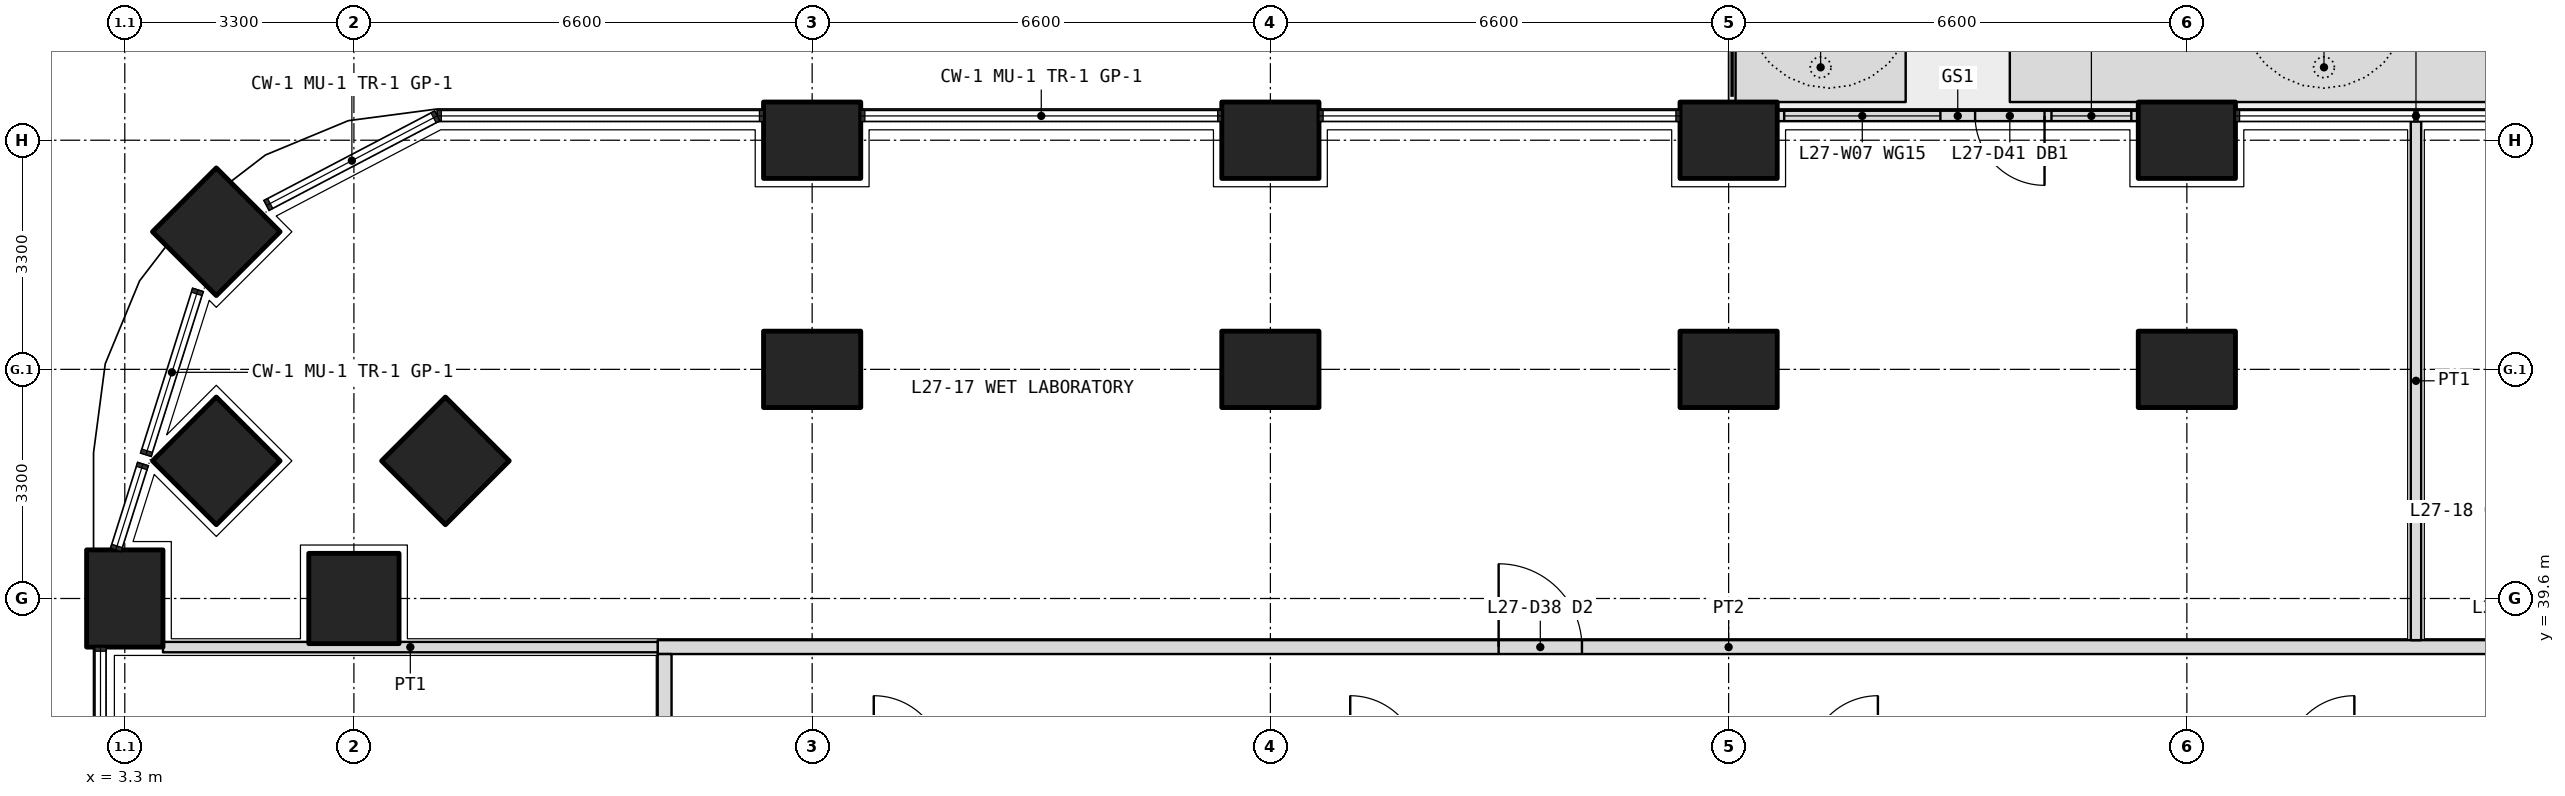
"""IFC4 building model, lengths in metres.
Left out: names, types, materials, properties, quantities, classifications, styles, units other than length and angle.
Written with IfcOpenShell. Run it as: python <this file> out.ifc"""

import sys

from ifc_helpers import new_model, si_unit, direction, frame, frame_2d, origin, origin_2d, place, context, subcontext, project, spatial, polyline, rectangle, outline, extrude, element, fill, save


model = new_model("IFC4")
c1 = context("Model", 3, precision=1e-05, world=origin(), true_north=direction((0.0, 1.0)))
c2 = subcontext(c1, "Body", "Model", "MODEL_VIEW")
j1 = project(units=[si_unit("LENGTHUNIT", "METRE"), si_unit("PLANEANGLEUNIT", "RADIAN")], contexts=[c1])
p1 = place(None, origin())
s1 = spatial("IfcSite", under=j1, at=p1, CompositionType="ELEMENT")
p2 = place(p1, origin())
s2 = spatial("IfcBuilding", under=s1, at=p2, CompositionType="ELEMENT")
p3 = place(p2, frame((0.0, 0.0, 120.0)))
s3 = spatial("IfcBuildingStorey", under=s2, at=p3, CompositionType="ELEMENT", Elevation=120.0)
p4 = place(p3, frame((4.618, 44.882, 0.0), z_axis=(0.0, 0.0, 1.0), x_axis=(0.707106781187, 0.707106781187, 0.0)))
e1 = element("IfcColumn", 1, at=p4, inside=s3, PredefinedType="COLUMN", context=c2, shape_type="SweptSolid", body=[
    extrude(rectangle(XDim=1.3, YDim=1.3, at=origin_2d()), origin(), (0.0, 0.0, 1.0), 4.2),
])
for number, where, z_axis, x_axis in (
    (2, (3.3, 39.6, 0.0), (0.0, 0.0, 1.0), (0.0, 1.0, 0.0)),
    (3, (13.2, 46.2, 0.0), (0.0, 0.0, 1.0), (1.0, 0.0, 0.0)),
    (4, (19.8, 46.2, 0.0), (0.0, 0.0, 1.0), (1.0, 0.0, 0.0)),
    (5, (26.4, 46.2, 0.0), (0.0, 0.0, 1.0), (1.0, 0.0, 0.0)),
    (6, (33.0, 46.2, 0.0), (0.0, 0.0, 1.0), (1.0, 0.0, 0.0)),
):
    element("IfcColumn", number, at=place(p3, frame(where, z_axis=z_axis, x_axis=x_axis)), inside=s3, PredefinedType="COLUMN", context=c2, shape_type="SweptSolid", body=[
        extrude(rectangle(XDim=1.4, YDim=1.1, at=origin_2d()), origin(), (0.0, 0.0, 1.0), 4.2),
    ])
for number, where, z_axis, x_axis in (
    (7, (6.6, 39.6, 0.0), (0.0, 0.0, 1.0), (1.0, 0.0, 0.0)),
    (8, (4.618, 41.582, 0.0), (0.0, 0.0, 1.0), (0.707, 0.707, 0.0)),
):
    element("IfcColumn", number, at=place(p3, frame(where, z_axis=z_axis, x_axis=x_axis)), inside=s3, PredefinedType="COLUMN", context=c2, shape_type="SweptSolid", body=[
        extrude(rectangle(XDim=1.3, YDim=1.3, at=origin_2d()), origin(), (0.0, 0.0, 1.0), 4.2),
    ])
for number, where, z_axis, x_axis in (
    (9, (13.2, 42.9, 0.0), (0.0, 0.0, 1.0), (1.0, 0.0, 0.0)),
    (10, (19.8, 42.9, 0.0), (0.0, 0.0, 1.0), (1.0, 0.0, 0.0)),
    (11, (26.4, 42.9, 0.0), (0.0, 0.0, 1.0), (1.0, 0.0, 0.0)),
    (12, (33.0, 42.9, 0.0), (0.0, 0.0, 1.0), (1.0, 0.0, 0.0)),
):
    element("IfcColumn", number, at=place(p3, frame(where, z_axis=z_axis, x_axis=x_axis)), inside=s3, PredefinedType="COLUMN", context=c2, shape_type="SweptSolid", body=[
        extrude(rectangle(XDim=1.4, YDim=1.1, at=origin_2d()), origin(), (0.0, 0.0, 1.0), 4.2),
    ])
p5 = place(p3, frame((7.918, 41.582, 0.0), z_axis=(0.0, 0.0, 1.0), x_axis=(0.707106781187, 0.707106781187, 0.0)))
e13 = element("IfcColumn", 13, at=p5, inside=s3, PredefinedType="COLUMN", context=c2, shape_type="SweptSolid", body=[
    extrude(rectangle(XDim=1.3, YDim=1.3, at=origin_2d()), origin(), (0.0, 0.0, 1.0), 4.2),
])
p6 = place(p3, origin())
e14 = element("IfcWall", 14, at=p6, inside=s3, PredefinedType="USERDEFINED", context=c2, shape_type="SweptSolid", body=[
    extrude(outline(polyline([(26.5, 46.75), (28.95, 46.75), (28.95, 47.75), (26.5, 47.75), (26.5, 46.75)]), holes=[polyline([(26.65, 46.9), (28.8, 46.9), (28.8, 47.6), (26.65, 47.6), (26.65, 46.9)])]), origin(), (0.0, 0.0, 1.0), 1.05),
])
p7 = place(p3, origin())
e15 = element("IfcWall", 15, at=p7, inside=s3, PredefinedType="USERDEFINED", context=c2, shape_type="SweptSolid", body=[
    extrude(outline(polyline([(30.45, 46.75), (39.5, 46.75), (39.5, 47.75), (30.45, 47.75), (30.45, 46.75)]), holes=[polyline([(30.6, 46.9), (39.35, 46.9), (39.35, 47.6), (30.6, 47.6), (30.6, 46.9)])]), origin(), (0.0, 0.0, 1.0), 1.05),
])
p8 = place(p3, frame((32.3, 46.55, 0.0), z_axis=(0.0, 0.0, 1.0), x_axis=(-1.0, 0.0, 0.0)))
e16 = element("IfcWall", 16, at=p8, inside=s3, PredefinedType="SOLIDWALL", context=c2, shape_type="SweptSolid", body=[
    extrude(rectangle(XDim=5.2, YDim=0.15, at=frame_2d((2.6, 0.0))), origin(), (0.0, 0.0, 1.0), 2.7),
])
p9 = place(p8, frame((1.35, 0.0, 0.0)))
e17 = element("IfcOpeningElement", 17, at=p9, cuts=e16, PredefinedType="OPENING", context=c2, shape_type="SweptSolid", body=[
    extrude(rectangle(XDim=1.0, YDim=2.4, at=frame_2d((0.5, 1.2))), frame((0.0, 0.085, 0.0), z_axis=(0.0, -1.0, 0.0), x_axis=(1.0, 0.0, 0.0)), (0.0, 0.0, 1.0), 0.17),
])
p10 = place(p8, frame((0.1, 0.0, 0.1)))
e18 = element("IfcOpeningElement", 18, at=p10, cuts=e16, PredefinedType="OPENING", context=c2, shape_type="SweptSolid", body=[
    extrude(rectangle(XDim=1.15, YDim=2.3, at=frame_2d((0.575, 1.15))), frame((0.0, 0.085, 0.0), z_axis=(0.0, -1.0, 0.0), x_axis=(1.0, 0.0, 0.0)), (0.0, 0.0, 1.0), 0.17),
])
p11 = place(p8, frame((2.85, 0.0, 0.1)))
e19 = element("IfcOpeningElement", 19, at=p11, cuts=e16, PredefinedType="OPENING", context=c2, shape_type="SweptSolid", body=[
    extrude(rectangle(XDim=2.25, YDim=2.3, at=frame_2d((1.125, 1.15))), frame((0.0, 0.085, 0.0), z_axis=(0.0, -1.0, 0.0), x_axis=(1.0, 0.0, 0.0)), (0.0, 0.0, 1.0), 0.17),
])
p12 = place(p3, frame((10.975, 38.9, 0.0), z_axis=(0.0, 0.0, 1.0), x_axis=(1.0, 0.0, 0.0)))
e20 = element("IfcWall", 20, at=p12, inside=s3, PredefinedType="PARTITIONING", context=c2, shape_type="SweptSolid", body=[
    extrude(rectangle(XDim=30.85, YDim=0.2, at=frame_2d((15.425, 0.0))), origin(), (0.0, 0.0, 1.0), 2.85),
])
p13 = place(p12, frame((12.113, 0.0, 0.0)))
e21 = element("IfcOpeningElement", 21, at=p13, cuts=e20, PredefinedType="OPENING", context=c2, shape_type="SweptSolid", body=[
    extrude(rectangle(XDim=1.2, YDim=2.1, at=frame_2d((0.6, 1.05))), frame((0.0, 0.11, 0.0), z_axis=(0.0, -1.0, 0.0), x_axis=(1.0, 0.0, 0.0)), (0.0, 0.0, 1.0), 0.22),
])
p14 = place(p12, frame((26.475, 0.0, 0.0)))
e22 = element("IfcOpeningElement", 22, at=p14, cuts=e20, PredefinedType="OPENING", context=c2, shape_type="SweptSolid", body=[
    extrude(rectangle(XDim=1.0, YDim=2.1, at=frame_2d((0.5, 1.05))), frame((0.0, 0.11, 0.0), z_axis=(0.0, -1.0, 0.0), x_axis=(1.0, 0.0, 0.0)), (0.0, 0.0, 1.0), 0.22),
])
p15 = place(p12, frame((29.188, 0.0, 0.0)))
e23 = element("IfcOpeningElement", 23, at=p15, cuts=e20, PredefinedType="OPENING", context=c2, shape_type="SweptSolid", body=[
    extrude(rectangle(XDim=1.0, YDim=2.1, at=frame_2d((0.5, 1.05))), frame((0.0, 0.11, 0.0), z_axis=(0.0, -1.0, 0.0), x_axis=(1.0, 0.0, 0.0)), (0.0, 0.0, 1.0), 0.22),
])
p16 = place(p3, frame((11.075, 11.175, 0.0), z_axis=(0.0, 0.0, 1.0), x_axis=(0.0, 1.0, 0.0)))
e24 = element("IfcWall", 24, at=p16, inside=s3, PredefinedType="PARTITIONING", context=c2, shape_type="SweptSolid", body=[
    extrude(rectangle(XDim=27.625, YDim=0.2, at=frame_2d((13.812, 0.0))), origin(), (0.0, 0.0, 1.0), 2.85),
])
p17 = place(p16, frame((0.462, 0.0, 0.0)))
e25 = element("IfcOpeningElement", 25, at=p17, cuts=e24, PredefinedType="OPENING", context=c2, shape_type="SweptSolid", body=[
    extrude(rectangle(XDim=1.0, YDim=2.1, at=frame_2d((0.5, 1.05))), frame((0.0, 0.11, 0.0), z_axis=(0.0, -1.0, 0.0), x_axis=(1.0, 0.0, 0.0)), (0.0, 0.0, 1.0), 0.22),
])
p18 = place(p16, frame((2.575, 0.0, 0.0)))
e26 = element("IfcOpeningElement", 26, at=p18, cuts=e24, PredefinedType="OPENING", context=c2, shape_type="SweptSolid", body=[
    extrude(rectangle(XDim=1.0, YDim=2.1, at=frame_2d((0.5, 1.05))), frame((0.0, 0.11, 0.0), z_axis=(0.0, -1.0, 0.0), x_axis=(1.0, 0.0, 0.0)), (0.0, 0.0, 1.0), 0.22),
])
p19 = place(p16, frame((5.65, 0.0, 0.0)))
e27 = element("IfcOpeningElement", 27, at=p19, cuts=e24, PredefinedType="OPENING", context=c2, shape_type="SweptSolid", body=[
    extrude(rectangle(XDim=0.9, YDim=2.1, at=frame_2d((0.45, 1.05))), frame((0.0, 0.11, 0.0), z_axis=(0.0, -1.0, 0.0), x_axis=(1.0, 0.0, 0.0)), (0.0, 0.0, 1.0), 0.22),
])
p20 = place(p16, frame((9.5, 0.0, 0.0)))
e28 = element("IfcOpeningElement", 28, at=p20, cuts=e24, PredefinedType="OPENING", context=c2, shape_type="SweptSolid", body=[
    extrude(rectangle(XDim=0.9, YDim=2.1, at=frame_2d((0.45, 1.05))), frame((0.0, 0.11, 0.0), z_axis=(0.0, -1.0, 0.0), x_axis=(1.0, 0.0, 0.0)), (0.0, 0.0, 1.0), 0.22),
])
p21 = place(p16, frame((13.025, 0.0, 0.0)))
e29 = element("IfcOpeningElement", 29, at=p21, cuts=e24, PredefinedType="OPENING", context=c2, shape_type="SweptSolid", body=[
    extrude(rectangle(XDim=1.0, YDim=2.1, at=frame_2d((0.5, 1.05))), frame((0.0, 0.11, 0.0), z_axis=(0.0, -1.0, 0.0), x_axis=(1.0, 0.0, 0.0)), (0.0, 0.0, 1.0), 0.22),
])
p22 = place(p16, frame((20.975, 0.0, 0.0)))
e30 = element("IfcOpeningElement", 30, at=p22, cuts=e24, PredefinedType="OPENING", context=c2, shape_type="SweptSolid", body=[
    extrude(rectangle(XDim=1.0, YDim=2.1, at=frame_2d((0.5, 1.05))), frame((0.0, 0.11, 0.0), z_axis=(0.0, -1.0, 0.0), x_axis=(1.0, 0.0, 0.0)), (0.0, 0.0, 1.0), 0.22),
])
p23 = place(p3, frame((3.85, 38.9, 0.0), z_axis=(0.0, 0.0, 1.0), x_axis=(1.0, 0.0, 0.0)))
e31 = element("IfcWall", 31, at=p23, inside=s3, PredefinedType="PARTITIONING", context=c2, shape_type="SweptSolid", body=[
    extrude(rectangle(XDim=7.125, YDim=0.15, at=frame_2d((3.562, 0.0))), origin(), (0.0, 0.0, 1.0), 2.85),
])
p24 = place(p3, frame((36.3, 46.47, 0.0), z_axis=(0.0, 0.0, 1.0), x_axis=(0.0, -1.0, 0.0)))
e32 = element("IfcWall", 32, at=p24, inside=s3, PredefinedType="PARTITIONING", context=c2, shape_type="SweptSolid", body=[
    extrude(rectangle(XDim=7.47, YDim=0.15, at=frame_2d((3.735, 0.0))), origin(), (0.0, 0.0, 1.0), 2.7),
])
p25 = place(p9, origin())
e33 = element("IfcDoor", 33, at=p25, inside=s3, OperationType="SINGLE_SWING_LEFT", PredefinedType="DOOR", context=c2, shape_type="SweptSolid", body=[
    extrude(rectangle(XDim=1.0, YDim=2.4, at=frame_2d((0.5, 1.2))), frame((0.0, 0.025, 0.0), z_axis=(0.0, -1.0, 0.0), x_axis=(1.0, 0.0, 0.0)), (0.0, 0.0, 1.0), 0.05),
])
fill(e17, e33)
p26 = place(p10, origin())
e34 = element("IfcWindow", 34, at=p26, inside=s3, PartitioningType="SINGLE_PANEL", PredefinedType="WINDOW", context=c2, shape_type="SweptSolid", body=[
    extrude(rectangle(XDim=1.15, YDim=2.3, at=frame_2d((0.575, 1.15))), frame((0.0, 0.03, 0.0), z_axis=(0.0, -1.0, 0.0), x_axis=(1.0, 0.0, 0.0)), (0.0, 0.0, 1.0), 0.06),
])
fill(e18, e34)
p27 = place(p11, origin())
e35 = element("IfcWindow", 35, at=p27, inside=s3, PartitioningType="SINGLE_PANEL", PredefinedType="WINDOW", context=c2, shape_type="SweptSolid", body=[
    extrude(rectangle(XDim=2.25, YDim=2.3, at=frame_2d((1.125, 1.15))), frame((0.0, 0.03, 0.0), z_axis=(0.0, -1.0, 0.0), x_axis=(1.0, 0.0, 0.0)), (0.0, 0.0, 1.0), 0.06),
])
fill(e19, e35)
p28 = place(p13, origin())
e36 = element("IfcDoor", 36, at=p28, inside=s3, OperationType="DOUBLE_DOOR_SINGLE_SWING", PredefinedType="DOOR", context=c2, shape_type="SweptSolid", body=[
    extrude(rectangle(XDim=1.2, YDim=2.1, at=frame_2d((0.6, 1.05))), frame((0.0, 0.025, 0.0), z_axis=(0.0, -1.0, 0.0), x_axis=(1.0, 0.0, 0.0)), (0.0, 0.0, 1.0), 0.05),
])
fill(e21, e36)
save(model, sys.argv[1])
